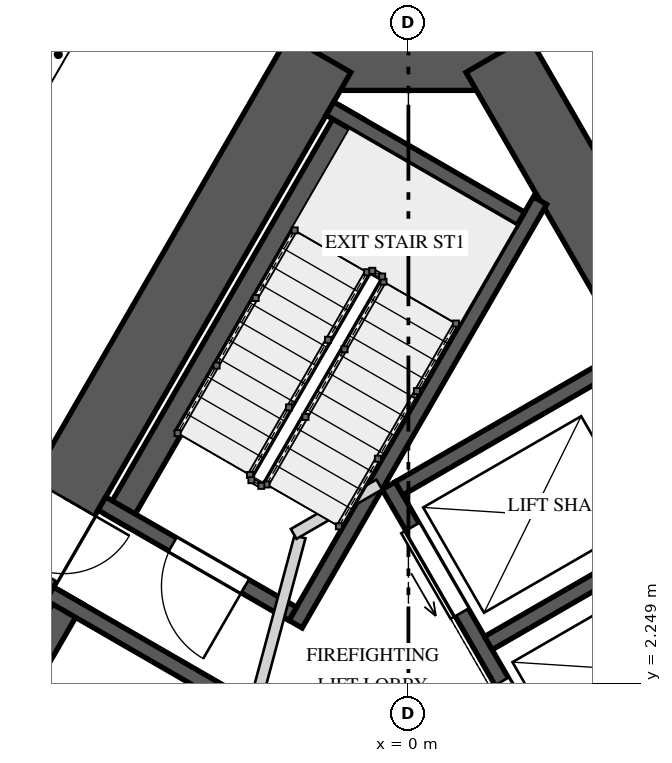
"""IFC4 building model, lengths in metres.
Left out: names, types, materials, properties, quantities, classifications, styles, units other than length and angle.
Written with IfcOpenShell. Run it as: python <this file> out.ifc"""

import sys

from ifc_helpers import new_model, si_unit, direction, frame, frame_2d, origin, place, context, subcontext, project, spatial, polyline, rectangle, outline, extrude, element, fill, save


model = new_model("IFC4")
c1 = context("Model", 3, precision=1e-05, world=origin(), true_north=direction((0.0, 1.0)))
c2 = subcontext(c1, "Body", "Model", "MODEL_VIEW")
j1 = project(units=[si_unit("LENGTHUNIT", "METRE"), si_unit("PLANEANGLEUNIT", "RADIAN")], contexts=[c1])
p1 = place(None, origin())
s1 = spatial("IfcSite", under=j1, at=p1, CompositionType="ELEMENT")
p2 = place(p1, origin())
s2 = spatial("IfcBuilding", under=s1, at=p2, CompositionType="ELEMENT")
p3 = place(p2, frame((0.0, 0.0, 88.4)))
s3 = spatial("IfcBuildingStorey", under=s2, at=p3, CompositionType="ELEMENT", Elevation=88.4)
p4 = place(p3, frame((1.443, 10.525, 0.0), z_axis=(0.0, 0.0, 1.0), x_axis=(-1.0, 0.0, 0.0)))
e1 = element("IfcWall", 1, at=p4, inside=s3, PredefinedType="SHEAR", context=c2, shape_type="SweptSolid", body=[
    extrude(rectangle(XDim=2.887, YDim=0.95, at=frame_2d((1.443, 0.0))), origin(), (0.0, 0.0, 1.0), 4.0),
])
p5 = place(p3, frame((-1.169, 10.525, 0.0), z_axis=(0.0, 0.0, 1.0), x_axis=(-0.499999102847, -0.866025921755, 0.0)))
e2 = element("IfcWall", 2, at=p5, inside=s3, PredefinedType="SHEAR", context=c2, shape_type="SweptSolid", body=[
    extrude(rectangle(XDim=17.061, YDim=0.95, at=frame_2d((8.53, 0.0))), origin(), (0.0, 0.0, 1.0), 4.0),
])
p6 = place(p5, frame((6.735, 0.0, 0.0)))
e3 = element("IfcOpeningElement", 3, at=p6, cuts=e2, PredefinedType="OPENING", context=c2, shape_type="SweptSolid", body=[
    extrude(rectangle(XDim=1.0, YDim=2.4, at=frame_2d((0.5, 1.2))), frame((0.0, 0.485, 0.0), z_axis=(0.0, -1.0, 0.0), x_axis=(1.0, 0.0, 0.0)), (0.0, 0.0, 1.0), 0.97),
])
p7 = place(p5, frame((14.613, 0.0, 0.0)))
e4 = element("IfcOpeningElement", 4, at=p7, cuts=e2, PredefinedType="OPENING", context=c2, shape_type="SweptSolid", body=[
    extrude(rectangle(XDim=0.8, YDim=2.1, at=frame_2d((0.4, 1.05))), frame((0.0, 0.485, 0.0), z_axis=(0.0, -1.0, 0.0), x_axis=(1.0, 0.0, 0.0)), (0.0, 0.0, 1.0), 0.97),
])
p8 = place(p3, frame((9.699, -4.25, 0.0), z_axis=(0.0, 0.0, 1.0), x_axis=(-0.499999102847, 0.866025921755, 0.0)))
e5 = element("IfcWall", 5, at=p8, inside=s3, PredefinedType="SHEAR", context=c2, shape_type="SweptSolid", body=[
    extrude(rectangle(XDim=17.061, YDim=0.95, at=frame_2d((8.53, 0.0))), origin(), (0.0, 0.0, 1.0), 4.0),
])
p9 = place(p8, frame((6.805, 0.0, 0.0)))
e6 = element("IfcOpeningElement", 6, at=p9, cuts=e5, PredefinedType="OPENING", context=c2, shape_type="SweptSolid", body=[
    extrude(rectangle(XDim=1.0, YDim=2.4, at=frame_2d((0.5, 1.2))), frame((0.0, 0.485, 0.0), z_axis=(0.0, -1.0, 0.0), x_axis=(1.0, 0.0, 0.0)), (0.0, 0.0, 1.0), 0.97),
])
p10 = place(p3, frame((-0.745, 9.76, 0.0), z_axis=(0.0, 0.0, 1.0), x_axis=(-0.49998037582, -0.866036733513, 0.0)))
e7 = element("IfcWall", 7, at=p10, inside=s3, PredefinedType="SOLIDWALL", context=c2, shape_type="SweptSolid", body=[
    extrude(rectangle(XDim=6.2, YDim=0.35, at=frame_2d((3.1, 0.0))), origin(), (0.0, 0.0, 1.0), 3.65),
])
p11 = place(p3, frame((1.732, 8.6, 0.0), z_axis=(0.0, 0.0, 1.0), x_axis=(-0.499975376872, -0.866039619487, 0.0)))
e8 = element("IfcWall", 8, at=p11, inside=s3, PredefinedType="SOLIDWALL", context=c2, shape_type="SweptSolid", body=[
    extrude(rectangle(XDim=6.434, YDim=0.2, at=frame_2d((3.217, 0.0))), origin(), (0.0, 0.0, 1.0), 3.65),
])
p12 = place(p3, frame((1.479, 8.361, 0.0), z_axis=(0.0, 0.0, 1.0), x_axis=(-0.866032775405, 0.499987231761, 0.0)))
e9 = element("IfcWall", 9, at=p12, inside=s3, PredefinedType="SOLIDWALL", context=c2, shape_type="SweptSolid", body=[
    extrude(rectangle(XDim=2.9, YDim=0.2, at=frame_2d((1.45, 0.0))), origin(), (0.0, 0.0, 1.0), 3.65),
])
p13 = place(p3, frame((-1.521, 3.165, 0.0), z_axis=(0.0, 0.0, 1.0), x_axis=(-0.866032775405, 0.499987231761, 0.0)))
e10 = element("IfcWall", 10, at=p13, inside=s3, PredefinedType="SOLIDWALL", context=c2, shape_type="SweptSolid", body=[
    extrude(rectangle(XDim=2.9, YDim=0.2, at=frame_2d((1.45, 0.0))), origin(), (0.0, 0.0, 1.0), 3.65),
])
p14 = place(p13, frame((0.725, 0.0, 0.0)))
e11 = element("IfcOpeningElement", 11, at=p14, cuts=e10, PredefinedType="OPENING", context=c2, shape_type="SweptSolid", body=[
    extrude(rectangle(XDim=1.1, YDim=2.4, at=frame_2d((0.55, 1.2))), frame((0.0, 0.11, 0.0), z_axis=(0.0, -1.0, 0.0), x_axis=(1.0, 0.0, 0.0)), (0.0, 0.0, 1.0), 0.22),
])
p15 = place(p3, frame((-4.43, 3.377, 0.0), z_axis=(0.0, 0.0, 1.0), x_axis=(-0.499996545922, -0.866027397988, 0.0)))
e12 = element("IfcWall", 12, at=p15, inside=s3, PredefinedType="SOLIDWALL", context=c2, shape_type="SweptSolid", body=[
    extrude(rectangle(XDim=5.5, YDim=0.35, at=frame_2d((2.75, 0.0))), origin(), (0.0, 0.0, 1.0), 3.65),
])
p16 = place(p3, frame((-2.38, 2.078, 0.0), z_axis=(0.0, 0.0, 1.0), x_axis=(-0.866059108428, 0.4999416173, 0.0)))
e13 = element("IfcWall", 13, at=p16, inside=s3, PredefinedType="SOLIDWALL", context=c2, shape_type="SweptSolid", body=[
    extrude(rectangle(XDim=2.7, YDim=0.2, at=frame_2d((1.35, 0.0))), origin(), (0.0, 0.0, 1.0), 3.65),
])
p17 = place(p3, frame((2.19, 0.606, 0.0), z_axis=(0.0, 0.0, 1.0), x_axis=(-0.500002801628, 0.866023786258, 0.0)))
e14 = element("IfcWall", 14, at=p17, inside=s3, PredefinedType="SOLIDWALL", context=c2, shape_type="SweptSolid", body=[
    extrude(rectangle(XDim=4.9, YDim=0.2, at=frame_2d((2.45, 0.0))), origin(), (0.0, 0.0, 1.0), 3.65),
])
p18 = place(p17, frame((0.625, 0.0, 0.0)))
e15 = element("IfcOpeningElement", 15, at=p18, cuts=e14, PredefinedType="OPENING", context=c2, shape_type="SweptSolid", body=[
    extrude(rectangle(XDim=1.3, YDim=2.1, at=frame_2d((0.65, 1.05))), frame((0.0, 0.11, 0.0), z_axis=(0.0, -1.0, 0.0), x_axis=(1.0, 0.0, 0.0)), (0.0, 0.0, 1.0), 0.22),
])
p19 = place(p17, frame((2.975, 0.0, 0.0)))
e16 = element("IfcOpeningElement", 16, at=p19, cuts=e14, PredefinedType="OPENING", context=c2, shape_type="SweptSolid", body=[
    extrude(rectangle(XDim=1.3, YDim=2.1, at=frame_2d((0.65, 1.05))), frame((0.0, 0.11, 0.0), z_axis=(0.0, -1.0, 0.0), x_axis=(1.0, 0.0, 0.0)), (0.0, 0.0, 1.0), 0.22),
])
for number, where, z_axis, x_axis in (
    (17, (2.227, 0.743, 0.0), (0.0, 0.0, 1.0), (0.866, 0.5, 0.0)),
    (18, (1.052, 2.778, 0.0), (0.0, 0.0, 1.0), (0.866, 0.5, 0.0)),
):
    element("IfcWall", number, at=place(p3, frame(where, z_axis=z_axis, x_axis=x_axis)), inside=s3, PredefinedType="SOLIDWALL", context=c2, shape_type="SweptSolid", body=[
        extrude(rectangle(XDim=3.5, YDim=0.2, at=frame_2d((1.75, 0.0))), origin(), (0.0, 0.0, 1.0), 3.65),
    ])
p20 = place(p3, frame((-0.123, 4.813, 0.0), z_axis=(0.0, 0.0, 1.0), x_axis=(0.866019471182, 0.500010275428, 0.0)))
e19 = element("IfcWall", 19, at=p20, inside=s3, PredefinedType="SOLIDWALL", context=c2, shape_type="SweptSolid", body=[
    extrude(rectangle(XDim=3.5, YDim=0.2, at=frame_2d((1.75, 0.0))), origin(), (0.0, 0.0, 1.0), 3.65),
])
p21 = place(p3, frame((-2.178, 1.372, 0.0), z_axis=(0.0, 0.0, 1.0), x_axis=(0.258808958833, 0.96592852884, 0.0)))
e20 = element("IfcWall", 20, at=p21, inside=s3, PredefinedType="PARTITIONING", context=c2, shape_type="SweptSolid", body=[
    extrude(rectangle(XDim=2.903, YDim=0.15, at=frame_2d((1.451, 0.0))), origin(), (0.0, 0.0, 1.0), 3.65),
])
p22 = place(p3, frame((-1.51, 4.215, 0.0), z_axis=(0.0, 0.0, 1.0), x_axis=(0.866085525409, 0.49989585183, 0.0)))
e21 = element("IfcWall", 21, at=p22, inside=s3, PredefinedType="PARTITIONING", context=c2, shape_type="SweptSolid", body=[
    extrude(rectangle(XDim=1.3, YDim=0.15, at=frame_2d((0.65, 0.0))), origin(), (0.0, 0.0, 1.0), 3.65),
])
p23 = place(p3, frame((-4.906, 10.003, 0.0), z_axis=(0.0, 0.0, 1.0), x_axis=(0.500096935553, 0.865969430783, 0.0)))
e22 = element("IfcWall", 22, at=p23, inside=s3, PredefinedType="SOLIDWALL", context=c2, shape_type="SweptSolid", body=[
    extrude(outline(polyline([(0.0, 0.0), (1.486, 0.0), (1.486, 2.55), (0.35, 2.55), (0.35, 3.65), (0.0, 3.65), (0.0, 0.0)])), frame((0.0, 0.1, 0.0), z_axis=(0.0, -1.0, 0.0), x_axis=(1.0, 0.0, 0.0)), (0.0, 0.0, 1.0), 0.2),
])
p24 = place(p23, frame((0.05, 0.0, 0.0)))
e23 = element("IfcOpeningElement", 23, at=p24, cuts=e22, PredefinedType="OPENING", context=c2, shape_type="SweptSolid", body=[
    extrude(rectangle(XDim=1.1, YDim=2.4, at=frame_2d((0.55, 1.2))), frame((0.0, 0.11, 0.0), z_axis=(0.0, -1.0, 0.0), x_axis=(1.0, 0.0, 0.0)), (0.0, 0.0, 1.0), 0.22),
])
p25 = place(p14, origin())
e24 = element("IfcDoor", 24, at=p25, inside=s3, OperationType="SINGLE_SWING_RIGHT", PredefinedType="DOOR", context=c2, shape_type="SweptSolid", body=[
    extrude(rectangle(XDim=1.1, YDim=2.4, at=frame_2d((0.55, 1.2))), frame((0.0, 0.025, 0.0), z_axis=(0.0, -1.0, 0.0), x_axis=(1.0, 0.0, 0.0)), (0.0, 0.0, 1.0), 0.05),
])
fill(e11, e24)
p26 = place(p18, origin())
e25 = element("IfcDoor", 25, at=p26, inside=s3, OperationType="SLIDING_TO_RIGHT", PredefinedType="DOOR", context=c2, shape_type="SweptSolid", body=[
    extrude(rectangle(XDim=1.3, YDim=2.1, at=frame_2d((0.65, 1.05))), frame((0.0, 0.025, 0.0), z_axis=(0.0, -1.0, 0.0), x_axis=(1.0, 0.0, 0.0)), (0.0, 0.0, 1.0), 0.05),
])
fill(e15, e25)
p27 = place(p19, origin())
e26 = element("IfcDoor", 26, at=p27, inside=s3, OperationType="SLIDING_TO_LEFT", PredefinedType="DOOR", context=c2, shape_type="SweptSolid", body=[
    extrude(rectangle(XDim=1.3, YDim=2.1, at=frame_2d((0.65, 1.05))), frame((0.0, 0.025, 0.0), z_axis=(0.0, -1.0, 0.0), x_axis=(1.0, 0.0, 0.0)), (0.0, 0.0, 1.0), 0.05),
])
fill(e16, e26)
p28 = place(p6, origin())
e27 = element("IfcDoor", 27, at=p28, inside=s3, OperationType="SINGLE_SWING_LEFT", PredefinedType="DOOR", context=c2, shape_type="SweptSolid", body=[
    extrude(rectangle(XDim=1.0, YDim=2.4, at=frame_2d((0.5, 1.2))), frame((0.0, 0.025, 0.0), z_axis=(0.0, -1.0, 0.0), x_axis=(1.0, 0.0, 0.0)), (0.0, 0.0, 1.0), 0.05),
])
fill(e3, e27)
p29 = place(p24, origin())
e28 = element("IfcDoor", 28, at=p29, inside=s3, OperationType="SINGLE_SWING_RIGHT", PredefinedType="DOOR", context=c2, shape_type="SweptSolid", body=[
    extrude(rectangle(XDim=1.1, YDim=2.4, at=frame_2d((0.55, 1.2))), frame((0.0, 0.025, 0.0), z_axis=(0.0, -1.0, 0.0), x_axis=(1.0, 0.0, 0.0)), (0.0, 0.0, 1.0), 0.05),
])
fill(e23, e28)
save(model, sys.argv[1])
